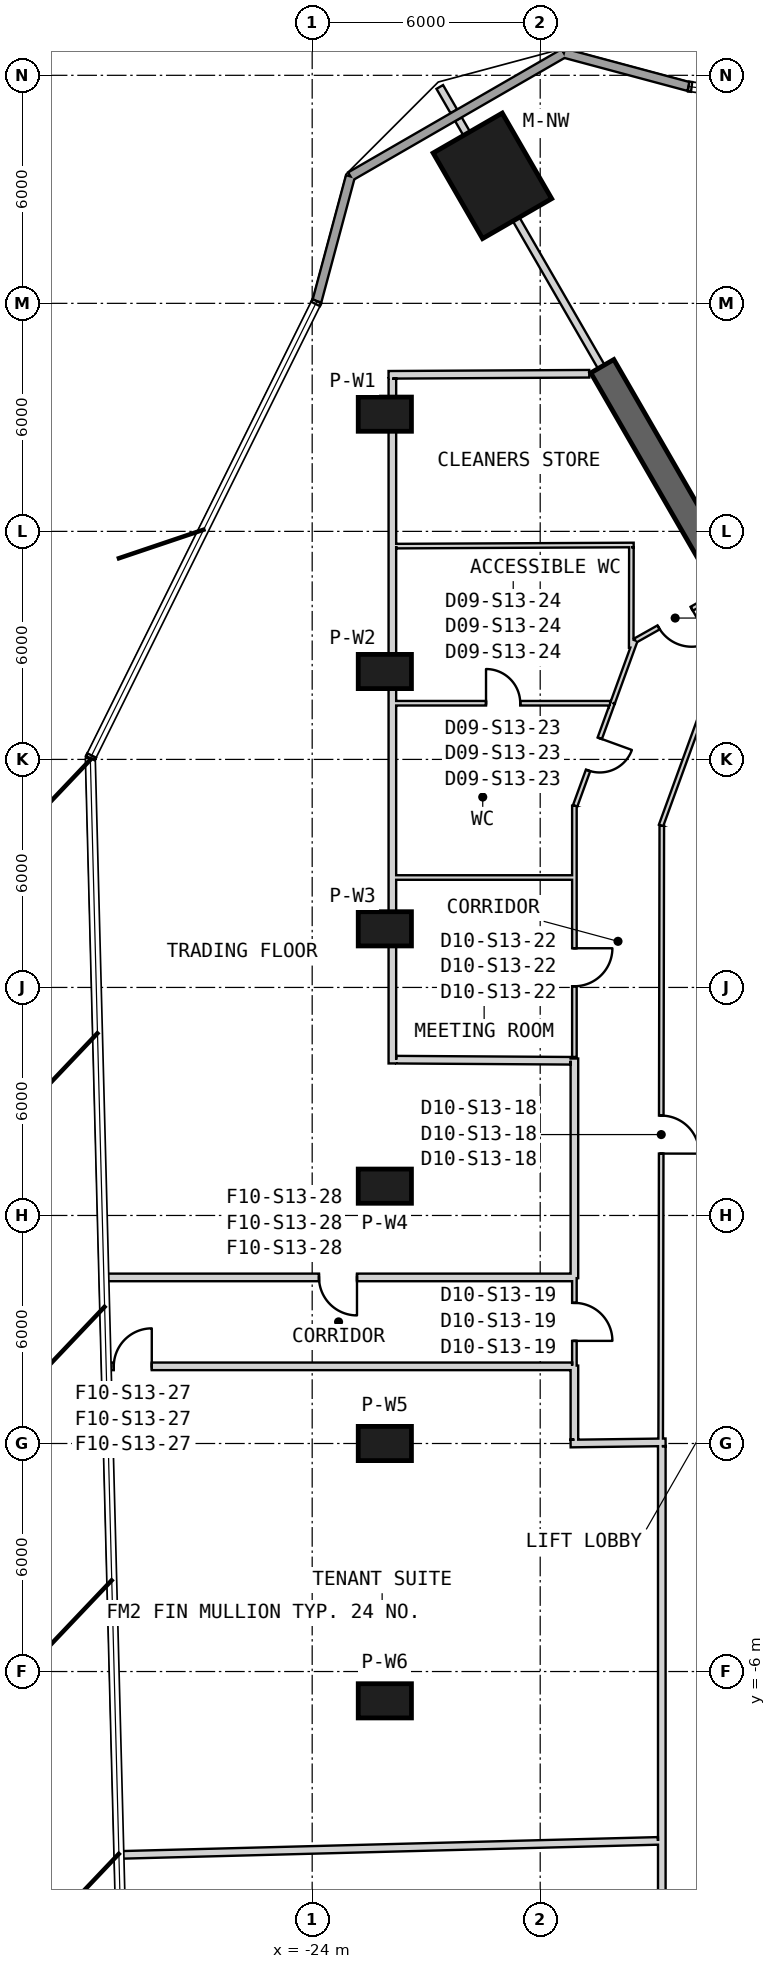
"""IFC4 building model, lengths in metres.
Left out: names, types, materials, properties, quantities, classifications, styles, units other than length and angle.
Written with IfcOpenShell. Run it as: python <this file> out.ifc"""

import sys

from ifc_helpers import new_model, si_unit, direction, frame, frame_2d, origin, origin_2d, place, context, subcontext, project, spatial, rectangle, extrude, element, fill, save


model = new_model("IFC4")
c1 = context("Model", 3, precision=1e-05, world=origin(), true_north=direction((0.0, 1.0)))
c2 = subcontext(c1, "Body", "Model", "MODEL_VIEW")
j1 = project(units=[si_unit("LENGTHUNIT", "METRE"), si_unit("PLANEANGLEUNIT", "RADIAN")], contexts=[c1])
p1 = place(None, origin())
s1 = spatial("IfcSite", under=j1, at=p1, CompositionType="ELEMENT")
p2 = place(p1, origin())
s2 = spatial("IfcBuilding", under=s1, at=p2, CompositionType="ELEMENT")
p3 = place(p2, frame((0.0, 0.0, 217.2)))
s3 = spatial("IfcBuildingStorey", under=s2, at=p3, CompositionType="ELEMENT", Elevation=217.2)
p4 = place(p3, frame((-19.258, 33.355, 0.0), z_axis=(0.0, 0.0, 1.0), x_axis=(-0.5, 0.866025403784, 0.0)))
e1 = element("IfcColumn", 1, at=p4, inside=s3, PredefinedType="COLUMN", context=c2, shape_type="SweptSolid", body=[
    extrude(rectangle(XDim=2.6, YDim=2.1, at=origin_2d()), origin(), (0.0, 0.0, 1.0), 4.0),
])
for number, where, z_axis, x_axis in (
    (2, (-22.088, 27.084, 0.0), (0.0, 0.0, 1.0), (-1.0, 0.0, 0.0)),
    (3, (-22.088, 20.313, 0.0), (0.0, 0.0, 1.0), (-1.0, 0.0, 0.0)),
    (4, (-22.088, 13.542, 0.0), (0.0, 0.0, 1.0), (-1.0, 0.0, 0.0)),
    (5, (-22.088, 6.771, 0.0), (0.0, 0.0, 1.0), (-1.0, 0.0, 0.0)),
    (6, (-22.088, 0.0, 0.0), (0.0, 0.0, 1.0), (-1.0, 0.0, 0.0)),
    (7, (-22.088, -6.771, 0.0), (0.0, 0.0, 1.0), (-1.0, 0.0, 0.0)),
):
    element("IfcColumn", number, at=place(p3, frame(where, z_axis=z_axis, x_axis=x_axis)), inside=s3, PredefinedType="COLUMN", context=c2, shape_type="SweptSolid", body=[
        extrude(rectangle(XDim=1.4, YDim=0.9, at=origin_2d()), origin(), (0.0, 0.0, 1.0), 4.0),
    ])
p5 = place(p3, frame((-10.575, 18.316, 0.0), z_axis=(0.0, 0.0, 1.0), x_axis=(-0.499998001389, 0.86602655768, 0.0)))
e8 = element("IfcWall", 8, at=p5, inside=s3, PredefinedType="SHEAR", context=c2, shape_type="SweptSolid", body=[
    extrude(rectangle(XDim=11.581, YDim=0.7, at=frame_2d((5.791, 0.0))), origin(), (0.0, 0.0, 1.0), 4.0),
])
p6 = place(p3, frame((-14.095, 35.705, 0.0), z_axis=(0.0, 0.0, 1.0), x_axis=(-0.965908597484, 0.258883335322, 0.0)))
e9 = element("IfcWall", 9, at=p6, inside=s3, PredefinedType="SOLIDWALL", context=c2, shape_type="SweptSolid", body=[
    extrude(rectangle(XDim=3.398, YDim=0.24, at=frame_2d((1.699, 0.0))), origin(), (0.0, 0.0, 1.0), 3.7),
])
p7 = place(p3, frame((-17.377, 36.585, 0.0), z_axis=(0.0, 0.0, 1.0), x_axis=(-0.866022628259, -0.50000480732, 0.0)))
e10 = element("IfcWall", 10, at=p7, inside=s3, PredefinedType="SOLIDWALL", context=c2, shape_type="SweptSolid", body=[
    extrude(rectangle(XDim=6.487, YDim=0.24, at=frame_2d((3.243, 0.0))), origin(), (0.0, 0.0, 1.0), 3.7),
])
p8 = place(p3, frame((-22.995, 33.342, 0.0), z_axis=(0.0, 0.0, 1.0), x_axis=(-0.25879706975, -0.965931714299, 0.0)))
e11 = element("IfcWall", 11, at=p8, inside=s3, PredefinedType="SOLIDWALL", context=c2, shape_type="SweptSolid", body=[
    extrude(rectangle(XDim=3.402, YDim=0.24, at=frame_2d((1.701, 0.0))), origin(), (0.0, 0.0, 1.0), 3.7),
])
p9 = place(p3, frame((-13.631, 19.53, 0.0), z_axis=(0.0, 0.0, 1.0), x_axis=(-0.342069878069, -0.939674517329, 0.0)))
e12 = element("IfcWall", 12, at=p9, inside=s3, PredefinedType="PARTITIONING", context=c2, shape_type="SweptSolid", body=[
    extrude(rectangle(XDim=3.479, YDim=0.12, at=frame_2d((1.739, 0.0))), origin(), (0.0, 0.0, 1.0), 2.78),
])
p10 = place(p3, frame((-14.8, 16.257, 0.0), z_axis=(0.0, 0.0, 1.0), x_axis=(-0.001847148781, -0.999998294019, 0.0)))
e13 = element("IfcWall", 13, at=p10, inside=s3, PredefinedType="PARTITIONING", context=c2, shape_type="SweptSolid", body=[
    extrude(rectangle(XDim=16.257, YDim=0.12, at=frame_2d((8.128, 0.0))), origin(), (0.0, 0.0, 1.0), 2.88),
])
p11 = place(p10, frame((7.629, 0.0, 0.0)))
e14 = element("IfcOpeningElement", 14, at=p11, cuts=e13, PredefinedType="OPENING", context=c2, shape_type="SweptSolid", body=[
    extrude(rectangle(XDim=1.0, YDim=2.1, at=frame_2d((0.5, 1.05))), frame((0.0, 0.07, 0.0), z_axis=(0.0, -1.0, 0.0), x_axis=(1.0, 0.0, 0.0)), (0.0, 0.0, 1.0), 0.14),
])
p12 = place(p3, frame((-17.1, 16.783, 0.0), z_axis=(0.0, 0.0, 1.0), x_axis=(0.0, -1.0, 0.0)))
e15 = element("IfcWall", 15, at=p12, inside=s3, PredefinedType="PARTITIONING", context=c2, shape_type="SweptSolid", body=[
    extrude(rectangle(XDim=6.613, YDim=0.12, at=frame_2d((3.306, 0.0))), origin(), (0.0, 0.0, 1.0), 2.88),
])
p13 = place(p12, frame((3.751, 0.0, 0.0)))
e16 = element("IfcOpeningElement", 16, at=p13, cuts=e15, PredefinedType="OPENING", context=c2, shape_type="SweptSolid", body=[
    extrude(rectangle(XDim=1.0, YDim=2.1, at=frame_2d((0.5, 1.05))), frame((0.0, 0.07, 0.0), z_axis=(0.0, -1.0, 0.0), x_axis=(1.0, 0.0, 0.0)), (0.0, 0.0, 1.0), 0.14),
])
p14 = place(p3, frame((-17.1, 4.35, 0.0), z_axis=(0.0, 0.0, 1.0), x_axis=(0.0, -1.0, 0.0)))
e17 = element("IfcWall", 17, at=p14, inside=s3, PredefinedType="PARTITIONING", context=c2, shape_type="SweptSolid", body=[
    extrude(rectangle(XDim=2.3, YDim=0.12, at=frame_2d((1.15, 0.0))), origin(), (0.0, 0.0, 1.0), 3.7),
])
p15 = place(p14, frame((0.65, 0.0, 0.0)))
e18 = element("IfcOpeningElement", 18, at=p15, cuts=e17, PredefinedType="OPENING", context=c2, shape_type="SweptSolid", body=[
    extrude(rectangle(XDim=1.0, YDim=2.1, at=frame_2d((0.5, 1.05))), frame((0.0, 0.07, 0.0), z_axis=(0.0, -1.0, 0.0), x_axis=(1.0, 0.0, 0.0)), (0.0, 0.0, 1.0), 0.14),
])
p16 = place(p3, frame((-17.2, -0.001, 0.0), z_axis=(0.0, 0.0, 1.0), x_axis=(0.999915662945, 0.012987185857, 0.0)))
e19 = element("IfcWall", 19, at=p16, inside=s3, PredefinedType="PARTITIONING", context=c2, shape_type="SweptSolid", body=[
    extrude(rectangle(XDim=2.5, YDim=0.2, at=frame_2d((1.25, 0.0))), origin(), (0.0, 0.0, 1.0), 3.07),
])
p17 = place(p3, frame((-17.1, 10.13, 0.0), z_axis=(0.0, 0.0, 1.0), x_axis=(0.0, -1.0, 0.0)))
e20 = element("IfcWall", 20, at=p17, inside=s3, PredefinedType="PARTITIONING", context=c2, shape_type="SweptSolid", body=[
    extrude(rectangle(XDim=5.78, YDim=0.2, at=frame_2d((2.89, 0.0))), origin(), (0.0, 0.0, 1.0), 3.07),
])
p18 = place(p3, frame((-17.1, 2.05, 0.0), z_axis=(0.0, 0.0, 1.0), x_axis=(0.0, -1.0, 0.0)))
e21 = element("IfcWall", 21, at=p18, inside=s3, PredefinedType="PARTITIONING", context=c2, shape_type="SweptSolid", body=[
    extrude(rectangle(XDim=1.95, YDim=0.2, at=frame_2d((0.975, 0.0))), origin(), (0.0, 0.0, 1.0), 3.07),
])
p19 = place(p3, frame((-15.496, 21.129, 0.0), z_axis=(0.0, 0.0, 1.0), x_axis=(-0.342023613346, -0.939691357795, 0.0)))
e22 = element("IfcWall", 22, at=p19, inside=s3, PredefinedType="PARTITIONING", context=c2, shape_type="SweptSolid", body=[
    extrude(rectangle(XDim=1.747, YDim=0.12, at=frame_2d((0.873, 0.0))), origin(), (0.0, 0.0, 1.0), 2.78),
])
p20 = place(p3, frame((-16.094, 19.488, 0.0), z_axis=(0.0, 0.0, 1.0), x_axis=(-0.342028686382, -0.939689511324, 0.0)))
e23 = element("IfcWall", 23, at=p20, inside=s3, PredefinedType="PARTITIONING", context=c2, shape_type="SweptSolid", body=[
    extrude(rectangle(XDim=2.882, YDim=0.12, at=frame_2d((1.441, 0.0))), origin(), (0.0, 0.0, 1.0), 2.78),
])
p21 = place(p20, frame((0.991, 0.0, 0.0)))
e24 = element("IfcOpeningElement", 24, at=p21, cuts=e23, PredefinedType="OPENING", context=c2, shape_type="SweptSolid", body=[
    extrude(rectangle(XDim=0.9, YDim=2.1, at=frame_2d((0.45, 1.05))), frame((0.0, 0.07, 0.0), z_axis=(0.0, -1.0, 0.0), x_axis=(1.0, 0.0, 0.0)), (0.0, 0.0, 1.0), 0.14),
])
p22 = place(p3, frame((-13.313, 22.359, 0.0), z_axis=(0.0, 0.0, 1.0), x_axis=(-0.87126053708, -0.490820819167, 0.0)))
e25 = element("IfcWall", 25, at=p22, inside=s3, PredefinedType="PARTITIONING", context=c2, shape_type="SweptSolid", body=[
    extrude(rectangle(XDim=2.506, YDim=0.12, at=frame_2d((1.253, 0.0))), origin(), (0.0, 0.0, 1.0), 3.7),
])
p23 = place(p22, frame((0.803, 0.0, 0.0)))
e26 = element("IfcOpeningElement", 26, at=p23, cuts=e25, PredefinedType="OPENING", context=c2, shape_type="SweptSolid", body=[
    extrude(rectangle(XDim=1.0, YDim=2.1, at=frame_2d((0.5, 1.05))), frame((0.0, 0.07, 0.0), z_axis=(0.0, -1.0, 0.0), x_axis=(1.0, 0.0, 0.0)), (0.0, 0.0, 1.0), 0.14),
])
p24 = place(p3, frame((-14.8, -0.07, 0.0), z_axis=(0.0, 0.0, 1.0), x_axis=(0.0, -1.0, 0.0)))
e27 = element("IfcWall", 27, at=p24, inside=s3, PredefinedType="PARTITIONING", context=c2, shape_type="SweptSolid", body=[
    extrude(rectangle(XDim=16.147, YDim=0.2, at=frame_2d((8.073, 0.0))), origin(), (0.0, 0.0, 1.0), 2.88),
])
p25 = place(p24, frame((12.765, 0.0, 0.0)))
e28 = element("IfcOpeningElement", 28, at=p25, cuts=e27, PredefinedType="OPENING", context=c2, shape_type="SweptSolid", body=[
    extrude(rectangle(XDim=1.0, YDim=2.1, at=frame_2d((0.5, 1.05))), frame((0.0, 0.11, 0.0), z_axis=(0.0, -1.0, 0.0), x_axis=(1.0, 0.0, 0.0)), (0.0, 0.0, 1.0), 0.22),
])
p26 = place(p3, frame((-29.421, 2.03, 0.0), z_axis=(0.0, 0.0, 1.0), x_axis=(1.0, 0.0, 0.0)))
e29 = element("IfcWall", 29, at=p26, inside=s3, PredefinedType="PARTITIONING", context=c2, shape_type="SweptSolid", body=[
    extrude(rectangle(XDim=12.261, YDim=0.2, at=frame_2d((6.13, 0.0))), origin(), (0.0, 0.0, 1.0), 3.7),
])
p27 = place(p26, frame((0.2, 0.0, 0.0)))
e30 = element("IfcOpeningElement", 30, at=p27, cuts=e29, PredefinedType="OPENING", context=c2, shape_type="SweptSolid", body=[
    extrude(rectangle(XDim=1.0, YDim=2.1, at=frame_2d((0.5, 1.05))), frame((0.0, 0.11, 0.0), z_axis=(0.0, -1.0, 0.0), x_axis=(1.0, 0.0, 0.0)), (0.0, 0.0, 1.0), 0.22),
])
p28 = place(p3, frame((-17.16, 4.37, 0.0), z_axis=(0.0, 0.0, 1.0), x_axis=(-1.0, 0.0, 0.0)))
e31 = element("IfcWall", 31, at=p28, inside=s3, PredefinedType="PARTITIONING", context=c2, shape_type="SweptSolid", body=[
    extrude(rectangle(XDim=12.322, YDim=0.2, at=frame_2d((6.161, 0.0))), origin(), (0.0, 0.0, 1.0), 3.7),
])
p29 = place(p28, frame((5.661, 0.0, 0.0)))
e32 = element("IfcOpeningElement", 32, at=p29, cuts=e31, PredefinedType="OPENING", context=c2, shape_type="SweptSolid", body=[
    extrude(rectangle(XDim=1.0, YDim=2.1, at=frame_2d((0.5, 1.05))), frame((0.0, 0.11, 0.0), z_axis=(0.0, -1.0, 0.0), x_axis=(1.0, 0.0, 0.0)), (0.0, 0.0, 1.0), 0.22),
])
p30 = place(p3, frame((-14.9, -10.456, 0.0), z_axis=(0.0, 0.0, 1.0), x_axis=(-0.999660259834, -0.026064629441, 0.0)))
e33 = element("IfcWall", 33, at=p30, inside=s3, PredefinedType="PARTITIONING", context=c2, shape_type="SweptSolid", body=[
    extrude(rectangle(XDim=14.191, YDim=0.2, at=frame_2d((7.095, 0.0))), origin(), (0.0, 0.0, 1.0), 2.98),
])
p31 = place(p3, frame((-20.643, 35.694, 0.0), z_axis=(0.0, 0.0, 1.0), x_axis=(0.500178781653, -0.865922159541, 0.0)))
e34 = element("IfcWall", 34, at=p31, inside=s3, PredefinedType="PARTITIONING", context=c2, shape_type="SweptSolid", body=[
    extrude(rectangle(XDim=0.741, YDim=0.2, at=frame_2d((0.371, 0.0))), origin(), (0.0, 0.0, 1.0), 3.7),
])
p32 = place(p3, frame((-20.152, 34.844, 0.0), z_axis=(0.0, 0.0, 1.0), x_axis=(0.500286910726, -0.865859692419, 0.0)))
e35 = element("IfcWall", 35, at=p32, inside=s3, PredefinedType="PARTITIONING", context=c2, shape_type="SweptSolid", body=[
    extrude(rectangle(XDim=0.437, YDim=0.2, at=frame_2d((0.218, 0.0))), origin(), (0.0, 0.0, 1.0), 3.7),
])
p33 = place(p3, frame((-18.634, 32.214, 0.0), z_axis=(0.0, 0.0, 1.0), x_axis=(0.499962811355, -0.866046873594, 0.0)))
e36 = element("IfcWall", 36, at=p33, inside=s3, PredefinedType="PARTITIONING", context=c2, shape_type="SweptSolid", body=[
    extrude(rectangle(XDim=4.484, YDim=0.2, at=frame_2d((2.242, 0.0))), origin(), (0.0, 0.0, 1.0), 3.27),
])
p34 = place(p3, frame((-21.89, 10.0, 0.0), z_axis=(0.0, 0.0, 1.0), x_axis=(0.0, 1.0, 0.0)))
e37 = element("IfcWall", 37, at=p34, inside=s3, PredefinedType="PARTITIONING", context=c2, shape_type="SweptSolid", body=[
    extrude(rectangle(XDim=9.478, YDim=0.2, at=frame_2d((4.739, 0.0))), origin(), (0.0, 0.0, 1.0), 3.7),
])
p35 = place(p3, frame((-21.89, 19.478, 0.0), z_axis=(0.0, 0.0, 1.0), x_axis=(0.0, 1.0, 0.0)))
e38 = element("IfcWall", 38, at=p35, inside=s3, PredefinedType="PARTITIONING", context=c2, shape_type="SweptSolid", body=[
    extrude(rectangle(XDim=4.134, YDim=0.2, at=frame_2d((2.067, 0.0))), origin(), (0.0, 0.0, 1.0), 3.7),
])
p36 = place(p3, frame((-21.89, 23.612, 0.0), z_axis=(0.0, 0.0, 1.0), x_axis=(0.0, 1.0, 0.0)))
e39 = element("IfcWall", 39, at=p36, inside=s3, PredefinedType="PARTITIONING", context=c2, shape_type="SweptSolid", body=[
    extrude(rectangle(XDim=4.408, YDim=0.2, at=frame_2d((2.204, 0.0))), origin(), (0.0, 0.0, 1.0), 2.78),
])
p37 = place(p3, frame((-21.79, 10.099, 0.0), z_axis=(0.0, 0.0, 1.0), x_axis=(0.99998030485, -0.006276138289, 0.0)))
e40 = element("IfcWall", 40, at=p37, inside=s3, PredefinedType="PARTITIONING", context=c2, shape_type="SweptSolid", body=[
    extrude(rectangle(XDim=4.59, YDim=0.2, at=frame_2d((2.295, 0.0))), origin(), (0.0, 0.0, 1.0), 3.7),
])
p38 = place(p3, frame((-16.709, 28.147, 0.0), z_axis=(0.0, 0.0, 1.0), x_axis=(-0.999985868011, -0.00531636886, 0.0)))
e41 = element("IfcWall", 41, at=p38, inside=s3, PredefinedType="PARTITIONING", context=c2, shape_type="SweptSolid", body=[
    extrude(rectangle(XDim=5.281, YDim=0.2, at=frame_2d((2.641, 0.0))), origin(), (0.0, 0.0, 1.0), 3.7),
])
p39 = place(p3, frame((-21.79, 14.892, 0.0), z_axis=(0.0, 0.0, 1.0), x_axis=(1.0, 0.0, 0.0)))
e42 = element("IfcWall", 42, at=p39, inside=s3, PredefinedType="PARTITIONING", context=c2, shape_type="SweptSolid", body=[
    extrude(rectangle(XDim=4.63, YDim=0.12, at=frame_2d((2.315, 0.0))), origin(), (0.0, 0.0, 1.0), 3.7),
])
p40 = place(p3, frame((-21.79, 19.478, 0.0), z_axis=(0.0, 0.0, 1.0), x_axis=(1.0, 0.0, 0.0)))
e43 = element("IfcWall", 43, at=p40, inside=s3, PredefinedType="PARTITIONING", context=c2, shape_type="SweptSolid", body=[
    extrude(rectangle(XDim=5.629, YDim=0.12, at=frame_2d((2.814, 0.0))), origin(), (0.0, 0.0, 1.0), 2.88),
])
p41 = place(p40, frame((2.365, 0.0, 0.0)))
e44 = element("IfcOpeningElement", 44, at=p41, cuts=e43, PredefinedType="OPENING", context=c2, shape_type="SweptSolid", body=[
    extrude(rectangle(XDim=0.9, YDim=2.1, at=frame_2d((0.45, 1.05))), frame((0.0, 0.07, 0.0), z_axis=(0.0, -1.0, 0.0), x_axis=(1.0, 0.0, 0.0)), (0.0, 0.0, 1.0), 0.14),
])
p42 = place(p3, frame((-21.79, 23.612, 0.0), z_axis=(0.0, 0.0, 1.0), x_axis=(0.999988644603, 0.004765570884, 0.0)))
e45 = element("IfcWall", 45, at=p42, inside=s3, PredefinedType="PARTITIONING", context=c2, shape_type="SweptSolid", body=[
    extrude(rectangle(XDim=6.25, YDim=0.12, at=frame_2d((3.125, 0.0))), origin(), (0.0, 0.0, 1.0), 2.78),
])
p43 = place(p3, frame((-15.605, 20.939, 0.0), z_axis=(0.0, 0.0, 1.0), x_axis=(0.001847571904, 0.999998293238, 0.0)))
e46 = element("IfcWall", 46, at=p43, inside=s3, PredefinedType="PARTITIONING", context=c2, shape_type="SweptSolid", body=[
    extrude(rectangle(XDim=2.643, YDim=0.12, at=frame_2d((1.321, 0.0))), origin(), (0.0, 0.0, 1.0), 3.7),
])
p44 = place(p11, origin())
e47 = element("IfcDoor", 47, at=p44, inside=s3, OperationType="SINGLE_SWING_RIGHT", PredefinedType="NOTDEFINED", context=c2, shape_type="SweptSolid", body=[
    extrude(rectangle(XDim=1.0, YDim=2.1, at=frame_2d((0.5, 1.05))), frame((0.0, 0.025, 0.0), z_axis=(0.0, -1.0, 0.0), x_axis=(1.0, 0.0, 0.0)), (0.0, 0.0, 1.0), 0.05),
])
fill(e14, e47)
p45 = place(p15, origin())
e48 = element("IfcDoor", 48, at=p45, inside=s3, OperationType="SINGLE_SWING_LEFT", PredefinedType="NOTDEFINED", context=c2, shape_type="SweptSolid", body=[
    extrude(rectangle(XDim=1.0, YDim=2.1, at=frame_2d((0.5, 1.05))), frame((0.0, 0.025, 0.0), z_axis=(0.0, -1.0, 0.0), x_axis=(1.0, 0.0, 0.0)), (0.0, 0.0, 1.0), 0.05),
])
fill(e18, e48)
p46 = place(p13, origin())
e49 = element("IfcDoor", 49, at=p46, inside=s3, OperationType="SINGLE_SWING_RIGHT", PredefinedType="NOTDEFINED", context=c2, shape_type="SweptSolid", body=[
    extrude(rectangle(XDim=1.0, YDim=2.1, at=frame_2d((0.5, 1.05))), frame((0.0, 0.025, 0.0), z_axis=(0.0, -1.0, 0.0), x_axis=(1.0, 0.0, 0.0)), (0.0, 0.0, 1.0), 0.05),
])
fill(e16, e49)
p47 = place(p21, origin())
e50 = element("IfcDoor", 50, at=p47, inside=s3, OperationType="SINGLE_SWING_LEFT", PredefinedType="NOTDEFINED", context=c2, shape_type="SweptSolid", body=[
    extrude(rectangle(XDim=0.9, YDim=2.1, at=frame_2d((0.45, 1.05))), frame((0.0, 0.025, 0.0), z_axis=(0.0, -1.0, 0.0), x_axis=(1.0, 0.0, 0.0)), (0.0, 0.0, 1.0), 0.05),
])
fill(e24, e50)
p48 = place(p41, origin())
e51 = element("IfcDoor", 51, at=p48, inside=s3, OperationType="SINGLE_SWING_LEFT", PredefinedType="NOTDEFINED", context=c2, shape_type="SweptSolid", body=[
    extrude(rectangle(XDim=0.9, YDim=2.1, at=frame_2d((0.45, 1.05))), frame((0.0, 0.025, 0.0), z_axis=(0.0, -1.0, 0.0), x_axis=(1.0, 0.0, 0.0)), (0.0, 0.0, 1.0), 0.05),
])
fill(e44, e51)
p49 = place(p23, origin())
e52 = element("IfcDoor", 52, at=p49, inside=s3, OperationType="SINGLE_SWING_LEFT", PredefinedType="NOTDEFINED", context=c2, shape_type="SweptSolid", body=[
    extrude(rectangle(XDim=1.0, YDim=2.1, at=frame_2d((0.5, 1.05))), frame((0.0, 0.025, 0.0), z_axis=(0.0, -1.0, 0.0), x_axis=(1.0, 0.0, 0.0)), (0.0, 0.0, 1.0), 0.05),
])
fill(e26, e52)
p50 = place(p27, origin())
e53 = element("IfcDoor", 53, at=p50, inside=s3, OperationType="SINGLE_SWING_LEFT", PredefinedType="USERDEFINED", context=c2, shape_type="SweptSolid", body=[
    extrude(rectangle(XDim=1.0, YDim=2.1, at=frame_2d((0.5, 1.05))), frame((0.0, 0.025, 0.0), z_axis=(0.0, -1.0, 0.0), x_axis=(1.0, 0.0, 0.0)), (0.0, 0.0, 1.0), 0.05),
])
fill(e30, e53)
p51 = place(p29, origin())
e54 = element("IfcDoor", 54, at=p51, inside=s3, OperationType="SINGLE_SWING_RIGHT", PredefinedType="USERDEFINED", context=c2, shape_type="SweptSolid", body=[
    extrude(rectangle(XDim=1.0, YDim=2.1, at=frame_2d((0.5, 1.05))), frame((0.0, 0.025, 0.0), z_axis=(0.0, -1.0, 0.0), x_axis=(1.0, 0.0, 0.0)), (0.0, 0.0, 1.0), 0.05),
])
fill(e32, e54)
save(model, sys.argv[1])
